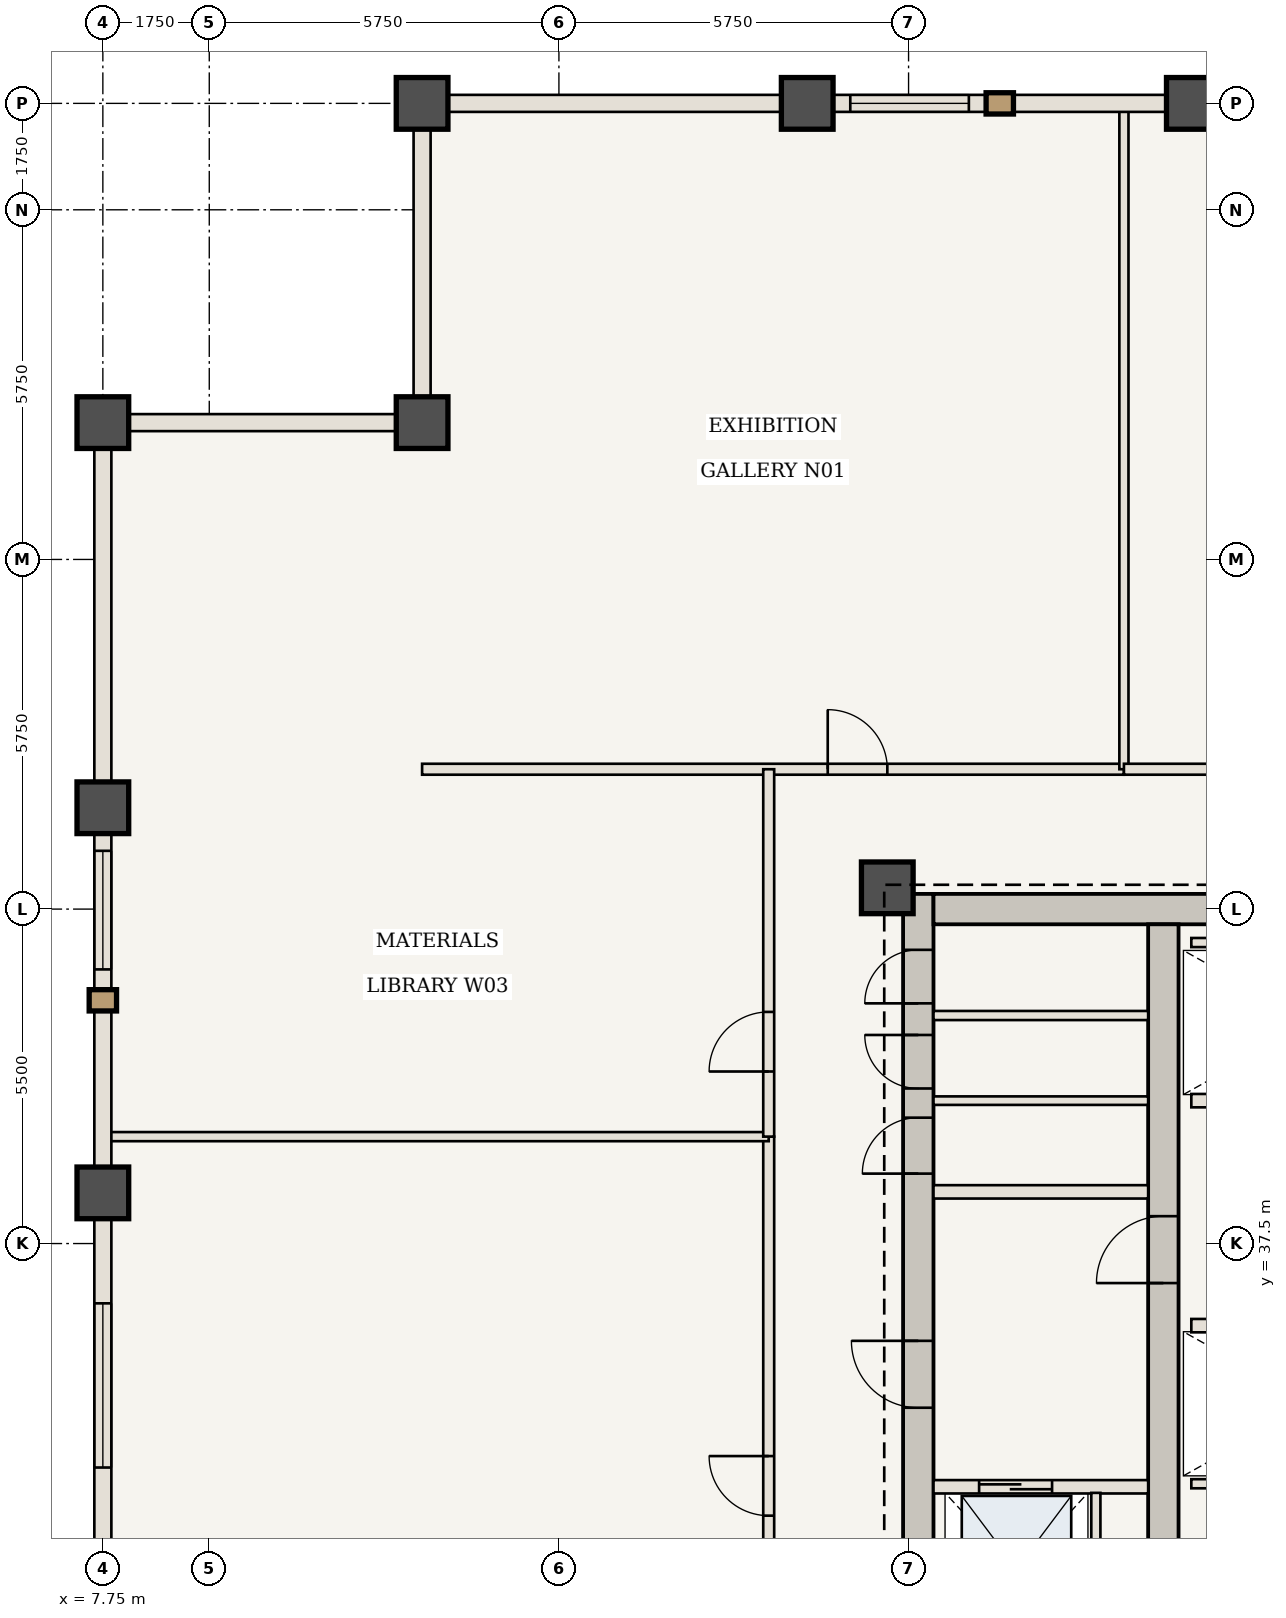
"""IFC4 building model, lengths in metres.
Left out: names, types, materials, properties, quantities, classifications, styles, units other than length and angle.
Written with IfcOpenShell. Run it as: python <this file> out.ifc"""

import sys

from ifc_helpers import new_model, si_unit, direction, frame, frame_2d, origin, origin_2d, place, context, subcontext, project, spatial, rectangle, extrude, element, fill, save


model = new_model("IFC4")
c1 = context("Model", 3, precision=1e-05, world=origin(), true_north=direction((0.0, 1.0)))
c2 = subcontext(c1, "Body", "Model", "MODEL_VIEW")
j1 = project(units=[si_unit("LENGTHUNIT", "METRE"), si_unit("PLANEANGLEUNIT", "RADIAN")], contexts=[c1])
p1 = place(None, origin())
s1 = spatial("IfcSite", under=j1, at=p1, CompositionType="ELEMENT")
p2 = place(p1, origin())
s2 = spatial("IfcBuilding", under=s1, at=p2, CompositionType="ELEMENT")
p3 = place(p2, frame((0.0, 0.0, 217.7)))
s3 = spatial("IfcBuildingStorey", under=s2, at=p3, CompositionType="ELEMENT", Elevation=217.7)
p4 = place(p3, frame((21.16, 30.6, 0.0), z_axis=(0.0, 0.0, 1.0), x_axis=(0.0, 1.0, 0.0)))
e1 = element("IfcWall", 1, at=p4, inside=s3, PredefinedType="SHEAR", context=c2, shape_type="SweptSolid", body=[
    extrude(rectangle(XDim=12.65, YDim=0.5, at=frame_2d((6.325, 0.0))), origin(), (0.0, 0.0, 1.0), 3.85),
])
p5 = place(p4, frame((4.2, 0.0, 0.0)))
e2 = element("IfcOpeningElement", 2, at=p5, cuts=e1, PredefinedType="OPENING", context=c2, shape_type="SweptSolid", body=[
    extrude(rectangle(XDim=1.1, YDim=2.15, at=frame_2d((0.55, 1.075))), frame((0.0, 0.26, 0.0), z_axis=(0.0, -1.0, 0.0), x_axis=(1.0, 0.0, 0.0)), (0.0, 0.0, 1.0), 0.52),
])
p6 = place(p4, frame((8.05, 0.0, 0.0)))
e3 = element("IfcOpeningElement", 3, at=p6, cuts=e1, PredefinedType="OPENING", context=c2, shape_type="SweptSolid", body=[
    extrude(rectangle(XDim=0.92, YDim=2.1, at=frame_2d((0.46, 1.05))), frame((0.0, 0.26, 0.0), z_axis=(0.0, -1.0, 0.0), x_axis=(1.0, 0.0, 0.0)), (0.0, 0.0, 1.0), 0.52),
])
p7 = place(p4, frame((9.45, 0.0, 0.0)))
e4 = element("IfcOpeningElement", 4, at=p7, cuts=e1, PredefinedType="OPENING", context=c2, shape_type="SweptSolid", body=[
    extrude(rectangle(XDim=0.88, YDim=2.1, at=frame_2d((0.44, 1.05))), frame((0.0, 0.26, 0.0), z_axis=(0.0, -1.0, 0.0), x_axis=(1.0, 0.0, 0.0)), (0.0, 0.0, 1.0), 0.52),
])
p8 = place(p4, frame((10.85, 0.0, 0.0)))
e5 = element("IfcOpeningElement", 5, at=p8, cuts=e1, PredefinedType="OPENING", context=c2, shape_type="SweptSolid", body=[
    extrude(rectangle(XDim=0.88, YDim=2.1, at=frame_2d((0.44, 1.05))), frame((0.0, 0.26, 0.0), z_axis=(0.0, -1.0, 0.0), x_axis=(1.0, 0.0, 0.0)), (0.0, 0.0, 1.0), 0.52),
])
p9 = place(p3, frame((21.41, 43.0, 0.0), z_axis=(0.0, 0.0, 1.0), x_axis=(1.0, 0.0, 0.0)))
e6 = element("IfcWall", 6, at=p9, inside=s3, PredefinedType="SHEAR", context=c2, shape_type="SweptSolid", body=[
    extrude(rectangle(XDim=12.79, YDim=0.5, at=frame_2d((6.395, 0.0))), origin(), (0.0, 0.0, 1.0), 3.85),
])
p10 = place(p3, frame((25.19, 30.6, 0.0), z_axis=(0.0, 0.0, 1.0), x_axis=(0.0, 1.0, 0.0)))
e7 = element("IfcWall", 7, at=p10, inside=s3, PredefinedType="SHEAR", context=c2, shape_type="SweptSolid", body=[
    extrude(rectangle(XDim=12.15, YDim=0.5, at=frame_2d((6.075, 0.0))), origin(), (0.0, 0.0, 1.0), 3.85),
])
p11 = place(p10, frame((6.25, 0.0, 0.0)))
e8 = element("IfcOpeningElement", 8, at=p11, cuts=e7, PredefinedType="OPENING", context=c2, shape_type="SweptSolid", body=[
    extrude(rectangle(XDim=1.1, YDim=2.15, at=frame_2d((0.55, 1.075))), frame((0.0, 0.26, 0.0), z_axis=(0.0, -1.0, 0.0), x_axis=(1.0, 0.0, 0.0)), (0.0, 0.0, 1.0), 0.52),
])
for number, where, z_axis, x_axis in (
    (9, (20.65, 43.35, 0.0), (0.0, 0.0, 1.0), (1.0, 0.0, 0.0)),
    (10, (13.0, 56.25, 0.0), (0.0, 0.0, 1.0), (1.0, 0.0, 0.0)),
    (11, (13.0, 51.0, 0.0), (0.0, 0.0, 1.0), (1.0, 0.0, 0.0)),
    (12, (7.75, 51.0, 0.0), (0.0, 0.0, 1.0), (1.0, 0.0, 0.0)),
    (13, (19.333, 56.25, 0.0), (0.0, 0.0, 1.0), (1.0, 0.0, 0.0)),
    (14, (25.667, 56.25, 0.0), (0.0, 0.0, 1.0), (1.0, 0.0, 0.0)),
    (15, (7.75, 38.333, 0.0), (0.0, 0.0, 1.0), (1.0, 0.0, 0.0)),
    (16, (7.75, 44.667, 0.0), (0.0, 0.0, 1.0), (1.0, 0.0, 0.0)),
):
    element("IfcColumn", number, at=place(p3, frame(where, z_axis=z_axis, x_axis=x_axis)), inside=s3, PredefinedType="COLUMN", context=c2, shape_type="SweptSolid", body=[
        extrude(rectangle(XDim=0.85, YDim=0.85, at=origin_2d()), origin(), (0.0, 0.0, 1.0), 3.85),
    ])
p12 = place(p3, frame((21.41, 33.5, 0.0), z_axis=(0.0, 0.0, 1.0), x_axis=(1.0, 0.0, 0.0)))
e17 = element("IfcWall", 17, at=p12, inside=s3, PredefinedType="STANDARD", context=c2, shape_type="SweptSolid", body=[
    extrude(rectangle(XDim=3.53, YDim=0.22, at=frame_2d((1.765, 0.0))), origin(), (0.0, 0.0, 1.0), 3.685),
])
p13 = place(p12, frame((0.75, 0.0, 0.0)))
e18 = element("IfcOpeningElement", 18, at=p13, cuts=e17, PredefinedType="OPENING", context=c2, shape_type="SweptSolid", body=[
    extrude(rectangle(XDim=1.2, YDim=2.2, at=frame_2d((0.6, 1.1))), frame((0.0, 0.12, 0.0), z_axis=(0.0, -1.0, 0.0), x_axis=(1.0, 0.0, 0.0)), (0.0, 0.0, 1.0), 0.24),
])
p14 = place(p3, frame((24.08, 30.75, 0.0), z_axis=(0.0, 0.0, 1.0), x_axis=(0.0, 1.0, 0.0)))
e19 = element("IfcWall", 19, at=p14, inside=s3, PredefinedType="STANDARD", context=c2, shape_type="SweptSolid", body=[
    extrude(rectangle(XDim=2.65, YDim=0.15, at=frame_2d((1.325, 0.0))), origin(), (0.0, 0.0, 1.0), 3.685),
])
p15 = place(p3, frame((21.41, 38.35, 0.0), z_axis=(0.0, 0.0, 1.0), x_axis=(1.0, 0.0, 0.0)))
e20 = element("IfcWall", 20, at=p15, inside=s3, PredefinedType="STANDARD", context=c2, shape_type="SweptSolid", body=[
    extrude(rectangle(XDim=3.53, YDim=0.22, at=frame_2d((1.765, 0.0))), origin(), (0.0, 0.0, 1.0), 3.685),
])
p16 = place(p3, frame((21.41, 39.85, 0.0), z_axis=(0.0, 0.0, 1.0), x_axis=(1.0, 0.0, 0.0)))
e21 = element("IfcWall", 21, at=p16, inside=s3, PredefinedType="STANDARD", context=c2, shape_type="SweptSolid", body=[
    extrude(rectangle(XDim=3.53, YDim=0.14, at=frame_2d((1.765, 0.0))), origin(), (0.0, 0.0, 1.0), 3.685),
])
p17 = place(p3, frame((21.41, 41.25, 0.0), z_axis=(0.0, 0.0, 1.0), x_axis=(1.0, 0.0, 0.0)))
e22 = element("IfcWall", 22, at=p17, inside=s3, PredefinedType="STANDARD", context=c2, shape_type="SweptSolid", body=[
    extrude(rectangle(XDim=3.53, YDim=0.15, at=frame_2d((1.765, 0.0))), origin(), (0.0, 0.0, 1.0), 3.685),
])
p18 = place(p3, frame((25.65, 36.15, 0.0), z_axis=(0.0, 0.0, 1.0), x_axis=(1.0, 0.0, 0.0)))
e23 = element("IfcWall", 23, at=p18, inside=s3, PredefinedType="STANDARD", context=c2, shape_type="SweptSolid", body=[
    extrude(rectangle(XDim=4.3, YDim=0.22, at=frame_2d((2.15, 0.0))), origin(), (0.0, 0.0, 1.0), 3.685),
])
p19 = place(p3, frame((25.65, 33.55, 0.0), z_axis=(0.0, 0.0, 1.0), x_axis=(1.0, 0.0, 0.0)))
e24 = element("IfcWall", 24, at=p19, inside=s3, PredefinedType="STANDARD", context=c2, shape_type="SweptSolid", body=[
    extrude(rectangle(XDim=4.2, YDim=0.15, at=frame_2d((2.1, 0.0))), origin(), (0.0, 0.0, 1.0), 3.685),
])
p20 = place(p3, frame((25.65, 39.85, 0.0), z_axis=(0.0, 0.0, 1.0), x_axis=(1.0, 0.0, 0.0)))
e25 = element("IfcWall", 25, at=p20, inside=s3, PredefinedType="STANDARD", context=c2, shape_type="SweptSolid", body=[
    extrude(rectangle(XDim=4.3, YDim=0.22, at=frame_2d((2.15, 0.0))), origin(), (0.0, 0.0, 1.0), 3.685),
])
p21 = place(p3, frame((25.65, 42.45, 0.0), z_axis=(0.0, 0.0, 1.0), x_axis=(1.0, 0.0, 0.0)))
e26 = element("IfcWall", 26, at=p21, inside=s3, PredefinedType="STANDARD", context=c2, shape_type="SweptSolid", body=[
    extrude(rectangle(XDim=4.2, YDim=0.15, at=frame_2d((2.1, 0.0))), origin(), (0.0, 0.0, 1.0), 3.685),
])
p22 = place(p3, frame((13.0, 45.3, 0.0), z_axis=(0.0, 0.0, 1.0), x_axis=(1.0, 0.0, 0.0)))
e27 = element("IfcWall", 27, at=p22, inside=s3, PredefinedType="STANDARD", context=c2, shape_type="SweptSolid", body=[
    extrude(rectangle(XDim=11.542, YDim=0.18, at=frame_2d((5.771, 0.0))), origin(), (0.0, 0.0, 1.0), 3.685),
])
p23 = place(p22, frame((6.671, 0.0, 0.0)))
e28 = element("IfcOpeningElement", 28, at=p23, cuts=e27, PredefinedType="OPENING", context=c2, shape_type="SweptSolid", body=[
    extrude(rectangle(XDim=0.98, YDim=2.2, at=frame_2d((0.49, 1.1))), frame((0.0, 0.1, 0.0), z_axis=(0.0, -1.0, 0.0), x_axis=(1.0, 0.0, 0.0)), (0.0, 0.0, 1.0), 0.2),
])
p24 = place(p3, frame((24.542, 45.3, 0.0), z_axis=(0.0, 0.0, 1.0), x_axis=(0.0, 1.0, 0.0)))
e29 = element("IfcWall", 29, at=p24, inside=s3, PredefinedType="STANDARD", context=c2, shape_type="SweptSolid", body=[
    extrude(rectangle(XDim=10.89, YDim=0.15, at=frame_2d((5.445, 0.0))), origin(), (0.0, 0.0, 1.0), 3.685),
])
p25 = place(p3, frame((24.542, 45.3, 0.0), z_axis=(0.0, 0.0, 1.0), x_axis=(1.0, 0.0, 0.0)))
e30 = element("IfcWall", 30, at=p25, inside=s3, PredefinedType="STANDARD", context=c2, shape_type="SweptSolid", body=[
    extrude(rectangle(XDim=26.458, YDim=0.18, at=frame_2d((13.229, 0.0))), origin(), (0.0, 0.0, 1.0), 3.685),
])
p26 = place(p25, frame((10.004, 0.0, 0.0)))
e31 = element("IfcOpeningElement", 31, at=p26, cuts=e30, PredefinedType="OPENING", context=c2, shape_type="SweptSolid", body=[
    extrude(rectangle(XDim=0.98, YDim=2.2, at=frame_2d((0.49, 1.1))), frame((0.0, 0.1, 0.0), z_axis=(0.0, -1.0, 0.0), x_axis=(1.0, 0.0, 0.0)), (0.0, 0.0, 1.0), 0.2),
])
p27 = place(p3, frame((18.7, 24.892, 0.0), z_axis=(0.0, 0.0, 1.0), x_axis=(0.0, 1.0, 0.0)))
e32 = element("IfcWall", 32, at=p27, inside=s3, PredefinedType="STANDARD", context=c2, shape_type="SweptSolid", body=[
    extrude(rectangle(XDim=14.367, YDim=0.18, at=frame_2d((7.183, 0.0))), origin(), (0.0, 0.0, 1.0), 3.685),
])
p28 = place(p27, frame((8.133, 0.0, 0.0)))
e33 = element("IfcOpeningElement", 33, at=p28, cuts=e32, PredefinedType="OPENING", context=c2, shape_type="SweptSolid", body=[
    extrude(rectangle(XDim=0.98, YDim=2.2, at=frame_2d((0.49, 1.1))), frame((0.0, 0.1, 0.0), z_axis=(0.0, -1.0, 0.0), x_axis=(1.0, 0.0, 0.0)), (0.0, 0.0, 1.0), 0.2),
])
p29 = place(p3, frame((7.81, 39.258, 0.0), z_axis=(0.0, 0.0, 1.0), x_axis=(1.0, 0.0, 0.0)))
e34 = element("IfcWall", 34, at=p29, inside=s3, PredefinedType="STANDARD", context=c2, shape_type="SweptSolid", body=[
    extrude(rectangle(XDim=10.89, YDim=0.15, at=frame_2d((5.445, 0.0))), origin(), (0.0, 0.0, 1.0), 3.685),
])
p30 = place(p3, frame((18.7, 39.258, 0.0), z_axis=(0.0, 0.0, 1.0), x_axis=(0.0, 1.0, 0.0)))
e35 = element("IfcWall", 35, at=p30, inside=s3, PredefinedType="STANDARD", context=c2, shape_type="SweptSolid", body=[
    extrude(rectangle(XDim=6.042, YDim=0.18, at=frame_2d((3.021, 0.0))), origin(), (0.0, 0.0, 1.0), 3.685),
])
p31 = place(p30, frame((1.071, 0.0, 0.0)))
e36 = element("IfcOpeningElement", 36, at=p31, cuts=e35, PredefinedType="OPENING", context=c2, shape_type="SweptSolid", body=[
    extrude(rectangle(XDim=0.98, YDim=2.2, at=frame_2d((0.49, 1.1))), frame((0.0, 0.1, 0.0), z_axis=(0.0, -1.0, 0.0), x_axis=(1.0, 0.0, 0.0)), (0.0, 0.0, 1.0), 0.2),
])
p32 = place(p3, frame((13.0, 56.25, 0.0), z_axis=(0.0, 0.0, 1.0), x_axis=(1.0, 0.0, 0.0)))
e37 = element("IfcWall", 37, at=p32, inside=s3, PredefinedType="USERDEFINED", context=c2, shape_type="SweptSolid", body=[
    extrude(rectangle(XDim=6.333, YDim=0.28, at=frame_2d((3.167, 0.0))), origin(), (0.0, 0.0, 1.0), 2.985),
])
p33 = place(p3, frame((19.333, 56.25, 0.0), z_axis=(0.0, 0.0, 1.0), x_axis=(1.0, 0.0, 0.0)))
e38 = element("IfcWall", 38, at=p33, inside=s3, PredefinedType="USERDEFINED", context=c2, shape_type="SweptSolid", body=[
    extrude(rectangle(XDim=6.333, YDim=0.28, at=frame_2d((3.167, 0.0))), origin(), (0.0, 0.0, 1.0), 2.985),
])
p34 = place(p33, frame((0.708, 0.0, 0.85)))
e39 = element("IfcOpeningElement", 39, at=p34, cuts=e38, PredefinedType="OPENING", context=c2, shape_type="SweptSolid", body=[
    extrude(rectangle(XDim=1.95, YDim=1.935, at=frame_2d((0.975, 0.968))), frame((0.0, 0.15, 0.0), z_axis=(0.0, -1.0, 0.0), x_axis=(1.0, 0.0, 0.0)), (0.0, 0.0, 1.0), 0.3),
])
p35 = place(p3, frame((25.667, 56.25, 0.0), z_axis=(0.0, 0.0, 1.0), x_axis=(1.0, 0.0, 0.0)))
e40 = element("IfcWall", 40, at=p35, inside=s3, PredefinedType="USERDEFINED", context=c2, shape_type="SweptSolid", body=[
    extrude(rectangle(XDim=6.333, YDim=0.28, at=frame_2d((3.167, 0.0))), origin(), (0.0, 0.0, 1.0), 2.985),
])
p36 = place(p35, frame((1.817, 0.0, 0.85)))
e41 = element("IfcOpeningElement", 41, at=p36, cuts=e40, PredefinedType="OPENING", context=c2, shape_type="SweptSolid", body=[
    extrude(rectangle(XDim=2.7, YDim=1.935, at=frame_2d((1.35, 0.968))), frame((0.0, 0.15, 0.0), z_axis=(0.0, -1.0, 0.0), x_axis=(1.0, 0.0, 0.0)), (0.0, 0.0, 1.0), 0.3),
])
p37 = place(p3, frame((7.75, 32.0, 0.0), z_axis=(0.0, 0.0, 1.0), x_axis=(0.0, 1.0, 0.0)))
e42 = element("IfcWall", 42, at=p37, inside=s3, PredefinedType="USERDEFINED", context=c2, shape_type="SweptSolid", body=[
    extrude(rectangle(XDim=6.333, YDim=0.28, at=frame_2d((3.167, 0.0))), origin(), (0.0, 0.0, 1.0), 2.985),
])
p38 = place(p37, frame((1.817, 0.0, 0.85)))
e43 = element("IfcOpeningElement", 43, at=p38, cuts=e42, PredefinedType="OPENING", context=c2, shape_type="SweptSolid", body=[
    extrude(rectangle(XDim=2.7, YDim=1.935, at=frame_2d((1.35, 0.968))), frame((0.0, 0.15, 0.0), z_axis=(0.0, -1.0, 0.0), x_axis=(1.0, 0.0, 0.0)), (0.0, 0.0, 1.0), 0.3),
])
p39 = place(p3, frame((7.75, 38.333, 0.0), z_axis=(0.0, 0.0, 1.0), x_axis=(0.0, 1.0, 0.0)))
e44 = element("IfcWall", 44, at=p39, inside=s3, PredefinedType="USERDEFINED", context=c2, shape_type="SweptSolid", body=[
    extrude(rectangle(XDim=6.333, YDim=0.28, at=frame_2d((3.167, 0.0))), origin(), (0.0, 0.0, 1.0), 2.985),
])
p40 = place(p39, frame((3.675, 0.0, 0.85)))
e45 = element("IfcOpeningElement", 45, at=p40, cuts=e44, PredefinedType="OPENING", context=c2, shape_type="SweptSolid", body=[
    extrude(rectangle(XDim=1.95, YDim=1.935, at=frame_2d((0.975, 0.968))), frame((0.0, 0.15, 0.0), z_axis=(0.0, -1.0, 0.0), x_axis=(1.0, 0.0, 0.0)), (0.0, 0.0, 1.0), 0.3),
])
p41 = place(p3, frame((7.75, 44.667, 0.0), z_axis=(0.0, 0.0, 1.0), x_axis=(0.0, 1.0, 0.0)))
e46 = element("IfcWall", 46, at=p41, inside=s3, PredefinedType="USERDEFINED", context=c2, shape_type="SweptSolid", body=[
    extrude(rectangle(XDim=6.333, YDim=0.28, at=frame_2d((3.167, 0.0))), origin(), (0.0, 0.0, 1.0), 2.985),
])
for number, where, z_axis, x_axis in (
    (47, (13.0, 51.0, 0.0), (0.0, 0.0, 1.0), (0.0, 1.0, 0.0)),
    (48, (7.75, 51.0, 0.0), (0.0, 0.0, 1.0), (1.0, 0.0, 0.0)),
):
    element("IfcWall", number, at=place(p3, frame(where, z_axis=z_axis, x_axis=x_axis)), inside=s3, PredefinedType="USERDEFINED", context=c2, shape_type="SweptSolid", body=[
        extrude(rectangle(XDim=5.25, YDim=0.28, at=frame_2d((2.625, 0.0))), origin(), (0.0, 0.0, 1.0), 2.985),
    ])
p42 = place(p5, origin())
e49 = element("IfcDoor", 49, at=p42, inside=s3, OperationType="SINGLE_SWING_RIGHT", PredefinedType="DOOR", context=c2, shape_type="SweptSolid", body=[
    extrude(rectangle(XDim=1.1, YDim=2.15, at=frame_2d((0.55, 1.075))), frame((0.0, 0.025, 0.0), z_axis=(0.0, -1.0, 0.0), x_axis=(1.0, 0.0, 0.0)), (0.0, 0.0, 1.0), 0.05),
])
fill(e2, e49)
p43 = place(p11, origin())
e50 = element("IfcDoor", 50, at=p43, inside=s3, OperationType="SINGLE_SWING_LEFT", PredefinedType="DOOR", context=c2, shape_type="SweptSolid", body=[
    extrude(rectangle(XDim=1.1, YDim=2.15, at=frame_2d((0.55, 1.075))), frame((0.0, 0.025, 0.0), z_axis=(0.0, -1.0, 0.0), x_axis=(1.0, 0.0, 0.0)), (0.0, 0.0, 1.0), 0.05),
])
fill(e8, e50)
p44 = place(p6, origin())
e51 = element("IfcDoor", 51, at=p44, inside=s3, OperationType="SINGLE_SWING_LEFT", PredefinedType="DOOR", context=c2, shape_type="SweptSolid", body=[
    extrude(rectangle(XDim=0.92, YDim=2.1, at=frame_2d((0.46, 1.05))), frame((0.0, 0.025, 0.0), z_axis=(0.0, -1.0, 0.0), x_axis=(1.0, 0.0, 0.0)), (0.0, 0.0, 1.0), 0.05),
])
fill(e3, e51)
p45 = place(p7, origin())
e52 = element("IfcDoor", 52, at=p45, inside=s3, OperationType="SINGLE_SWING_RIGHT", PredefinedType="DOOR", context=c2, shape_type="SweptSolid", body=[
    extrude(rectangle(XDim=0.88, YDim=2.1, at=frame_2d((0.44, 1.05))), frame((0.0, 0.025, 0.0), z_axis=(0.0, -1.0, 0.0), x_axis=(1.0, 0.0, 0.0)), (0.0, 0.0, 1.0), 0.05),
])
fill(e4, e52)
p46 = place(p8, origin())
e53 = element("IfcDoor", 53, at=p46, inside=s3, OperationType="SINGLE_SWING_LEFT", PredefinedType="DOOR", context=c2, shape_type="SweptSolid", body=[
    extrude(rectangle(XDim=0.88, YDim=2.1, at=frame_2d((0.44, 1.05))), frame((0.0, 0.025, 0.0), z_axis=(0.0, -1.0, 0.0), x_axis=(1.0, 0.0, 0.0)), (0.0, 0.0, 1.0), 0.05),
])
fill(e5, e53)
p47 = place(p13, origin())
e54 = element("IfcDoor", 54, at=p47, inside=s3, OperationType="DOUBLE_DOOR_SLIDING", PredefinedType="DOOR", context=c2, shape_type="SweptSolid", body=[
    extrude(rectangle(XDim=1.2, YDim=2.2, at=frame_2d((0.6, 1.1))), frame((0.0, 0.025, 0.0), z_axis=(0.0, -1.0, 0.0), x_axis=(1.0, 0.0, 0.0)), (0.0, 0.0, 1.0), 0.05),
])
fill(e18, e54)
p48 = place(p23, origin())
e55 = element("IfcDoor", 55, at=p48, inside=s3, OperationType="SINGLE_SWING_LEFT", PredefinedType="DOOR", context=c2, shape_type="SweptSolid", body=[
    extrude(rectangle(XDim=0.98, YDim=2.2, at=frame_2d((0.49, 1.1))), frame((0.0, 0.025, 0.0), z_axis=(0.0, -1.0, 0.0), x_axis=(1.0, 0.0, 0.0)), (0.0, 0.0, 1.0), 0.05),
])
fill(e28, e55)
p49 = place(p28, origin())
e56 = element("IfcDoor", 56, at=p49, inside=s3, OperationType="SINGLE_SWING_RIGHT", PredefinedType="DOOR", context=c2, shape_type="SweptSolid", body=[
    extrude(rectangle(XDim=0.98, YDim=2.2, at=frame_2d((0.49, 1.1))), frame((0.0, 0.025, 0.0), z_axis=(0.0, -1.0, 0.0), x_axis=(1.0, 0.0, 0.0)), (0.0, 0.0, 1.0), 0.05),
])
fill(e33, e56)
p50 = place(p31, origin())
e57 = element("IfcDoor", 57, at=p50, inside=s3, OperationType="SINGLE_SWING_LEFT", PredefinedType="DOOR", context=c2, shape_type="SweptSolid", body=[
    extrude(rectangle(XDim=0.98, YDim=2.2, at=frame_2d((0.49, 1.1))), frame((0.0, 0.025, 0.0), z_axis=(0.0, -1.0, 0.0), x_axis=(1.0, 0.0, 0.0)), (0.0, 0.0, 1.0), 0.05),
])
fill(e36, e57)
p51 = place(p34, origin())
e58 = element("IfcWindow", 58, at=p51, inside=s3, PartitioningType="SINGLE_PANEL", PredefinedType="WINDOW", context=c2, shape_type="SweptSolid", body=[
    extrude(rectangle(XDim=1.95, YDim=1.935, at=frame_2d((0.975, 0.968))), frame((0.0, 0.03, 0.0), z_axis=(0.0, -1.0, 0.0), x_axis=(1.0, 0.0, 0.0)), (0.0, 0.0, 1.0), 0.06),
])
fill(e39, e58)
p52 = place(p38, origin())
e59 = element("IfcWindow", 59, at=p52, inside=s3, PartitioningType="SINGLE_PANEL", PredefinedType="WINDOW", context=c2, shape_type="SweptSolid", body=[
    extrude(rectangle(XDim=2.7, YDim=1.935, at=frame_2d((1.35, 0.968))), frame((0.0, 0.03, 0.0), z_axis=(0.0, -1.0, 0.0), x_axis=(1.0, 0.0, 0.0)), (0.0, 0.0, 1.0), 0.06),
])
fill(e43, e59)
p53 = place(p40, origin())
e60 = element("IfcWindow", 60, at=p53, inside=s3, PartitioningType="SINGLE_PANEL", PredefinedType="WINDOW", context=c2, shape_type="SweptSolid", body=[
    extrude(rectangle(XDim=1.95, YDim=1.935, at=frame_2d((0.975, 0.968))), frame((0.0, 0.03, 0.0), z_axis=(0.0, -1.0, 0.0), x_axis=(1.0, 0.0, 0.0)), (0.0, 0.0, 1.0), 0.06),
])
fill(e45, e60)
save(model, sys.argv[1])
